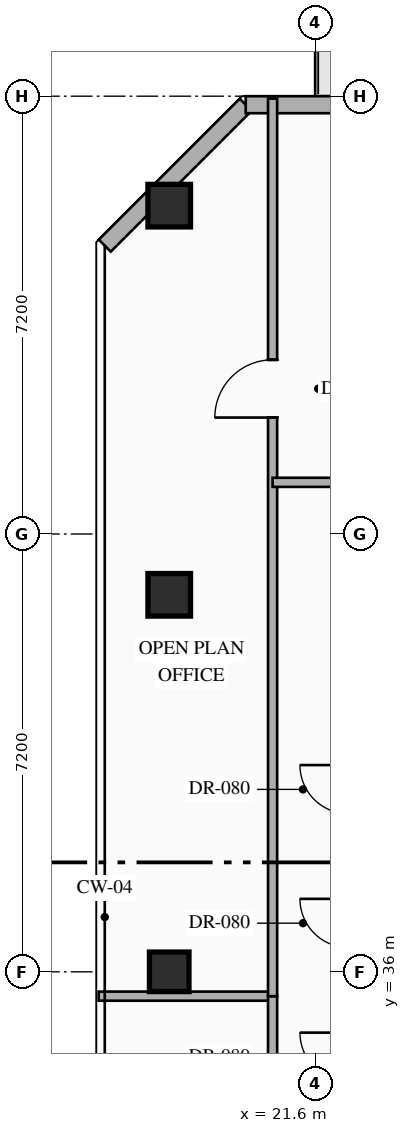
"""IFC4 building model, lengths in metres.
Left out: names, types, materials, properties, quantities, classifications, styles, units other than length and angle.
Written with IfcOpenShell. Run it as: python <this file> out.ifc"""

import sys

from ifc_helpers import new_model, si_unit, direction, frame, frame_2d, origin, origin_2d, place, context, subcontext, project, spatial, rectangle, hollow_rectangle, extrude, element, fill, save


model = new_model("IFC4")
c1 = context("Model", 3, precision=1e-05, world=origin(), true_north=direction((0.0, 1.0)))
c2 = subcontext(c1, "Body", "Model", "MODEL_VIEW")
j1 = project(units=[si_unit("LENGTHUNIT", "METRE"), si_unit("PLANEANGLEUNIT", "RADIAN")], contexts=[c1])
p1 = place(None, origin())
s1 = spatial("IfcSite", under=j1, at=p1, CompositionType="ELEMENT")
p2 = place(p1, origin())
s2 = spatial("IfcBuilding", under=s1, at=p2, CompositionType="ELEMENT")
p3 = place(p2, frame((0.0, 0.0, 234.75)))
s3 = spatial("IfcBuildingStorey", under=s2, at=p3, CompositionType="ELEMENT", Elevation=234.75)
for number, where, z_axis, x_axis in (
    (1, (19.2, 48.6, 0.0), (0.0, 0.0, 1.0), (1.0, 0.0, 0.0)),
    (2, (19.2, 42.2, 0.0), (0.0, 0.0, 1.0), (1.0, 0.0, 0.0)),
):
    element("IfcColumn", number, at=place(p3, frame(where, z_axis=z_axis, x_axis=x_axis)), inside=s3, PredefinedType="COLUMN", context=c2, shape_type="SweptSolid", body=[
        extrude(hollow_rectangle(XDim=0.7, YDim=0.7, WallThickness=0.028, at=origin_2d()), origin(), (0.0, 0.0, 1.0), 4.8),
    ])
p4 = place(p3, frame((19.2, 36.0, 0.0), z_axis=(0.0, 0.0, 1.0), x_axis=(1.0, 0.0, 0.0)))
e3 = element("IfcColumn", 3, at=p4, inside=s3, PredefinedType="COLUMN", context=c2, shape_type="SweptSolid", body=[
    extrude(hollow_rectangle(XDim=0.65, YDim=0.65, WallThickness=0.025, at=origin_2d()), origin(), (0.0, 0.0, 1.0), 4.8),
])
p5 = place(p3, frame((18.14, 47.942, 0.0), z_axis=(0.0, 0.0, 1.0), x_axis=(0.707106781187, 0.707106781187, 0.0)))
e4 = element("IfcWall", 4, at=p5, inside=s3, PredefinedType="STANDARD", context=c2, shape_type="SweptSolid", body=[
    extrude(rectangle(XDim=3.278, YDim=0.28, at=frame_2d((1.639, 0.0))), origin(), (0.0, 0.0, 1.0), 4.55),
])
p6 = place(p3, frame((20.458, 50.26, 0.0), z_axis=(0.0, 0.0, 1.0), x_axis=(1.0, 0.0, 0.0)))
e5 = element("IfcWall", 5, at=p6, inside=s3, PredefinedType="STANDARD", context=c2, shape_type="SweptSolid", body=[
    extrude(rectangle(XDim=22.084, YDim=0.28, at=frame_2d((11.042, 0.0))), origin(), (0.0, 0.0, 1.0), 4.55),
])
p7 = place(p6, frame((2.1, 0.0, 0.0)))
e6 = element("IfcOpeningElement", 6, at=p7, cuts=e5, PredefinedType="OPENING", context=c2, shape_type="SweptSolid", body=[
    extrude(rectangle(XDim=1.1, YDim=2.2, at=frame_2d((0.55, 1.1))), frame((0.0, 0.15, 0.0), z_axis=(0.0, -1.0, 0.0), x_axis=(1.0, 0.0, 0.0)), (0.0, 0.0, 1.0), 0.3),
])
p8 = place(p3, frame((18.04, 35.6, 0.0), z_axis=(0.0, 0.0, 1.0), x_axis=(1.0, 0.0, 0.0)))
e7 = element("IfcWall", 7, at=p8, inside=s3, PredefinedType="PARTITIONING", context=c2, shape_type="SweptSolid", body=[
    extrude(rectangle(XDim=2.86, YDim=0.15, at=frame_2d((1.43, 0.0))), origin(), (0.0, 0.0, 1.0), 4.55),
])
p9 = place(p3, frame((20.9, 23.44, 0.0), z_axis=(0.0, 0.0, 1.0), x_axis=(0.0, 1.0, 0.0)))
e8 = element("IfcWall", 8, at=p9, inside=s3, PredefinedType="PARTITIONING", context=c2, shape_type="SweptSolid", body=[
    extrude(rectangle(XDim=12.16, YDim=0.15, at=frame_2d((6.08, 0.0))), origin(), (0.0, 0.0, 1.0), 4.55),
])
p10 = place(p9, frame((7.695, 0.0, 0.0)))
e9 = element("IfcOpeningElement", 9, at=p10, cuts=e8, PredefinedType="OPENING", context=c2, shape_type="SweptSolid", body=[
    extrude(rectangle(XDim=0.95, YDim=2.15, at=frame_2d((0.475, 1.075))), frame((0.0, 0.085, 0.0), z_axis=(0.0, -1.0, 0.0), x_axis=(1.0, 0.0, 0.0)), (0.0, 0.0, 1.0), 0.17),
])
p11 = place(p3, frame((20.9, 35.6, 0.0), z_axis=(0.0, 0.0, 1.0), x_axis=(0.0, 1.0, 0.0)))
e10 = element("IfcWall", 10, at=p11, inside=s3, PredefinedType="PARTITIONING", context=c2, shape_type="SweptSolid", body=[
    extrude(rectangle(XDim=14.76, YDim=0.15, at=frame_2d((7.38, 0.0))), origin(), (0.0, 0.0, 1.0), 4.55),
])
p12 = place(p11, frame((9.515, 0.0, 0.0)))
e11 = element("IfcOpeningElement", 11, at=p12, cuts=e10, PredefinedType="OPENING", context=c2, shape_type="SweptSolid", body=[
    extrude(rectangle(XDim=0.95, YDim=2.15, at=frame_2d((0.475, 1.075))), frame((0.0, 0.085, 0.0), z_axis=(0.0, -1.0, 0.0), x_axis=(1.0, 0.0, 0.0)), (0.0, 0.0, 1.0), 0.17),
])
p13 = place(p3, frame((20.9, 44.05, 0.0), z_axis=(0.0, 0.0, 1.0), x_axis=(1.0, 0.0, 0.0)))
e12 = element("IfcWall", 12, at=p13, inside=s3, PredefinedType="PARTITIONING", context=c2, shape_type="SweptSolid", body=[
    extrude(rectangle(XDim=9.3, YDim=0.15, at=frame_2d((4.65, 0.0))), origin(), (0.0, 0.0, 1.0), 4.55),
])
p14 = place(p13, frame((2.657, 0.0, 0.0)))
e13 = element("IfcOpeningElement", 13, at=p14, cuts=e12, PredefinedType="OPENING", context=c2, shape_type="SweptSolid", body=[
    extrude(rectangle(XDim=0.95, YDim=2.15, at=frame_2d((0.475, 1.075))), frame((0.0, 0.085, 0.0), z_axis=(0.0, -1.0, 0.0), x_axis=(1.0, 0.0, 0.0)), (0.0, 0.0, 1.0), 0.17),
])
p15 = place(p12, origin())
e14 = element("IfcDoor", 14, at=p15, inside=s3, OperationType="SINGLE_SWING_LEFT", PredefinedType="DOOR", context=c2, shape_type="SweptSolid", body=[
    extrude(rectangle(XDim=0.95, YDim=2.15, at=frame_2d((0.475, 1.075))), frame((0.0, 0.025, 0.0), z_axis=(0.0, -1.0, 0.0), x_axis=(1.0, 0.0, 0.0)), (0.0, 0.0, 1.0), 0.05),
])
fill(e11, e14)
save(model, sys.argv[1])
